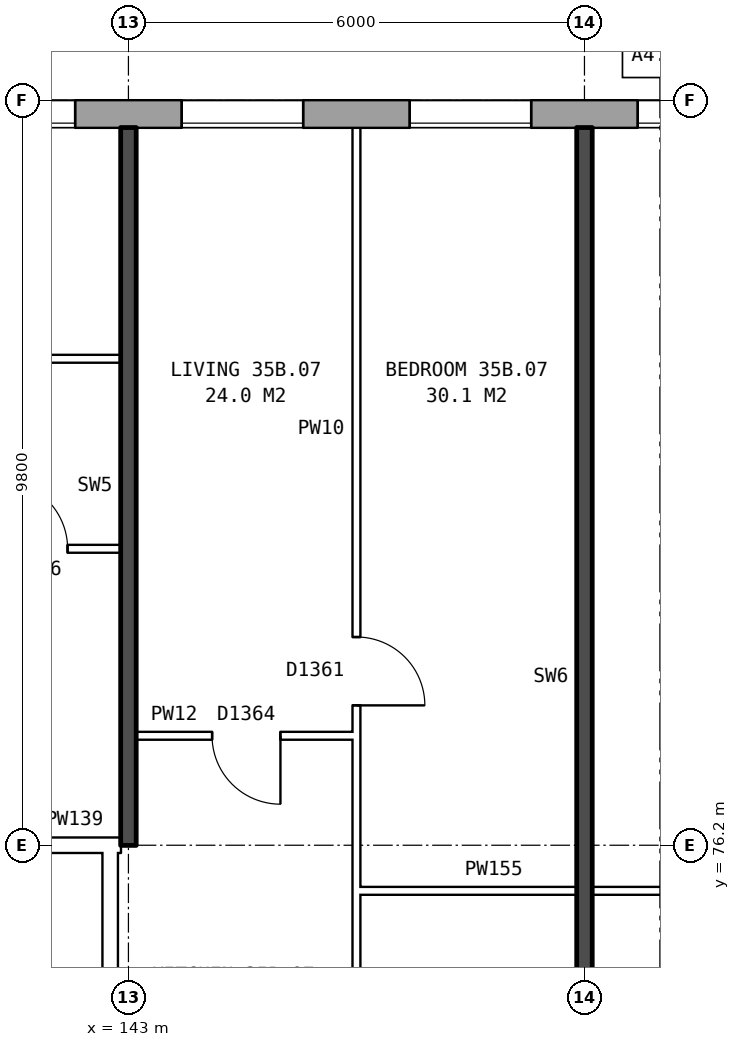
"""IFC4 building model, lengths in metres.
Left out: names, types, materials, properties, quantities, classifications, styles, units other than length and angle.
Written with IfcOpenShell. Run it as: python <this file> out.ifc"""

import sys

from ifc_helpers import new_model, si_unit, direction, frame, frame_2d, origin, place, context, subcontext, project, spatial, rectangle, extrude, element, fill, save


model = new_model("IFC4")
c1 = context("Model", 3, precision=1e-05, world=origin(), true_north=direction((0.0, 1.0)))
c2 = subcontext(c1, "Body", "Model", "MODEL_VIEW")
j1 = project(units=[si_unit("LENGTHUNIT", "METRE"), si_unit("PLANEANGLEUNIT", "RADIAN")], contexts=[c1])
p1 = place(None, origin())
s1 = spatial("IfcSite", under=j1, at=p1, CompositionType="ELEMENT")
p2 = place(p1, origin())
s2 = spatial("IfcBuilding", under=s1, at=p2, CompositionType="ELEMENT")
p3 = place(p2, frame((0.0, 0.0, 126.8)))
s3 = spatial("IfcBuildingStorey", under=s2, at=p3, CompositionType="ELEMENT", Elevation=126.8)
p4 = place(p3, frame((169.675, 85.82, 0.0), z_axis=(0.0, 0.0, 1.0), x_axis=(-1.0, 0.0, 0.0)))
e1 = element("IfcWall", 1, at=p4, inside=s3, PredefinedType="STANDARD", context=c2, shape_type="SweptSolid", body=[
    extrude(rectangle(XDim=35.601, YDim=0.36, at=frame_2d((17.8, 0.0))), origin(), (0.0, 0.0, 1.0), 2.85),
])
p5 = place(p4, frame((0.375, 0.0, 0.8)))
e2 = element("IfcOpeningElement", 2, at=p5, cuts=e1, PredefinedType="OPENING", context=c2, shape_type="SweptSolid", body=[
    extrude(rectangle(XDim=1.6, YDim=1.8, at=frame_2d((0.8, 0.9))), frame((0.0, 0.19, 0.0), z_axis=(0.0, -1.0, 0.0), x_axis=(1.0, 0.0, 0.0)), (0.0, 0.0, 1.0), 0.38),
])
p6 = place(p4, frame((2.875, 0.0, 0.8)))
e3 = element("IfcOpeningElement", 3, at=p6, cuts=e1, PredefinedType="OPENING", context=c2, shape_type="SweptSolid", body=[
    extrude(rectangle(XDim=1.0, YDim=1.8, at=frame_2d((0.5, 0.9))), frame((0.0, 0.19, 0.0), z_axis=(0.0, -1.0, 0.0), x_axis=(1.0, 0.0, 0.0)), (0.0, 0.0, 1.0), 0.38),
])
p7 = place(p4, frame((4.175, 0.0, 1.6)))
e4 = element("IfcOpeningElement", 4, at=p7, cuts=e1, PredefinedType="OPENING", context=c2, shape_type="SweptSolid", body=[
    extrude(rectangle(XDim=0.6, YDim=0.9, at=frame_2d((0.3, 0.45))), frame((0.0, 0.19, 0.0), z_axis=(0.0, -1.0, 0.0), x_axis=(1.0, 0.0, 0.0)), (0.0, 0.0, 1.0), 0.38),
])
p8 = place(p4, frame((9.375, 0.0, 0.8)))
e5 = element("IfcOpeningElement", 5, at=p8, cuts=e1, PredefinedType="OPENING", context=c2, shape_type="SweptSolid", body=[
    extrude(rectangle(XDim=1.6, YDim=1.8, at=frame_2d((0.8, 0.9))), frame((0.0, 0.19, 0.0), z_axis=(0.0, -1.0, 0.0), x_axis=(1.0, 0.0, 0.0)), (0.0, 0.0, 1.0), 0.38),
])
p9 = place(p4, frame((12.375, 0.0, 0.8)))
e6 = element("IfcOpeningElement", 6, at=p9, cuts=e1, PredefinedType="OPENING", context=c2, shape_type="SweptSolid", body=[
    extrude(rectangle(XDim=1.6, YDim=1.8, at=frame_2d((0.8, 0.9))), frame((0.0, 0.19, 0.0), z_axis=(0.0, -1.0, 0.0), x_axis=(1.0, 0.0, 0.0)), (0.0, 0.0, 1.0), 0.38),
])
p10 = place(p4, frame((15.375, 0.0, 0.8)))
e7 = element("IfcOpeningElement", 7, at=p10, cuts=e1, PredefinedType="OPENING", context=c2, shape_type="SweptSolid", body=[
    extrude(rectangle(XDim=1.6, YDim=1.8, at=frame_2d((0.8, 0.9))), frame((0.0, 0.19, 0.0), z_axis=(0.0, -1.0, 0.0), x_axis=(1.0, 0.0, 0.0)), (0.0, 0.0, 1.0), 0.38),
])
p11 = place(p4, frame((18.375, 0.0, 0.8)))
e8 = element("IfcOpeningElement", 8, at=p11, cuts=e1, PredefinedType="OPENING", context=c2, shape_type="SweptSolid", body=[
    extrude(rectangle(XDim=1.6, YDim=1.8, at=frame_2d((0.8, 0.9))), frame((0.0, 0.19, 0.0), z_axis=(0.0, -1.0, 0.0), x_axis=(1.0, 0.0, 0.0)), (0.0, 0.0, 1.0), 0.38),
])
p12 = place(p4, frame((21.375, 0.0, 0.8)))
e9 = element("IfcOpeningElement", 9, at=p12, cuts=e1, PredefinedType="OPENING", context=c2, shape_type="SweptSolid", body=[
    extrude(rectangle(XDim=1.6, YDim=1.8, at=frame_2d((0.8, 0.9))), frame((0.0, 0.19, 0.0), z_axis=(0.0, -1.0, 0.0), x_axis=(1.0, 0.0, 0.0)), (0.0, 0.0, 1.0), 0.38),
])
p13 = place(p4, frame((24.375, 0.0, 0.8)))
e10 = element("IfcOpeningElement", 10, at=p13, cuts=e1, PredefinedType="OPENING", context=c2, shape_type="SweptSolid", body=[
    extrude(rectangle(XDim=1.6, YDim=1.8, at=frame_2d((0.8, 0.9))), frame((0.0, 0.19, 0.0), z_axis=(0.0, -1.0, 0.0), x_axis=(1.0, 0.0, 0.0)), (0.0, 0.0, 1.0), 0.38),
])
p14 = place(p4, frame((27.375, 0.0, 0.8)))
e11 = element("IfcOpeningElement", 11, at=p14, cuts=e1, PredefinedType="OPENING", context=c2, shape_type="SweptSolid", body=[
    extrude(rectangle(XDim=1.6, YDim=1.8, at=frame_2d((0.8, 0.9))), frame((0.0, 0.19, 0.0), z_axis=(0.0, -1.0, 0.0), x_axis=(1.0, 0.0, 0.0)), (0.0, 0.0, 1.0), 0.38),
])
p15 = place(p4, frame((30.675, 0.0, 1.7)))
e12 = element("IfcOpeningElement", 12, at=p15, cuts=e1, PredefinedType="OPENING", context=c2, shape_type="SweptSolid", body=[
    extrude(rectangle(XDim=0.6, YDim=0.9, at=frame_2d((0.3, 0.45))), frame((0.0, 0.19, 0.0), z_axis=(0.0, -1.0, 0.0), x_axis=(1.0, 0.0, 0.0)), (0.0, 0.0, 1.0), 0.38),
])
p16 = place(p4, frame((33.375, 0.0, 0.8)))
e13 = element("IfcOpeningElement", 13, at=p16, cuts=e1, PredefinedType="OPENING", context=c2, shape_type="SweptSolid", body=[
    extrude(rectangle(XDim=1.6, YDim=1.8, at=frame_2d((0.8, 0.9))), frame((0.0, 0.19, 0.0), z_axis=(0.0, -1.0, 0.0), x_axis=(1.0, 0.0, 0.0)), (0.0, 0.0, 1.0), 0.38),
])
p17 = place(p4, frame((5.975, 0.0, 0.8)))
e14 = element("IfcOpeningElement", 14, at=p17, cuts=e1, PredefinedType="OPENING", context=c2, shape_type="SweptSolid", body=[
    extrude(rectangle(XDim=0.6, YDim=0.9, at=frame_2d((0.3, 0.45))), frame((0.0, 0.19, 0.0), z_axis=(0.0, -1.0, 0.0), x_axis=(1.0, 0.0, 0.0)), (0.0, 0.0, 1.0), 0.38),
])
p18 = place(p4, frame((6.875, 0.0, 0.8)))
e15 = element("IfcOpeningElement", 15, at=p18, cuts=e1, PredefinedType="OPENING", context=c2, shape_type="SweptSolid", body=[
    extrude(rectangle(XDim=1.6, YDim=1.8, at=frame_2d((0.8, 0.9))), frame((0.0, 0.19, 0.0), z_axis=(0.0, -1.0, 0.0), x_axis=(1.0, 0.0, 0.0)), (0.0, 0.0, 1.0), 0.38),
])
p19 = place(p4, frame((31.575, 0.0, 0.8)))
e16 = element("IfcOpeningElement", 16, at=p19, cuts=e1, PredefinedType="OPENING", context=c2, shape_type="SweptSolid", body=[
    extrude(rectangle(XDim=0.8, YDim=1.8, at=frame_2d((0.4, 0.9))), frame((0.0, 0.19, 0.0), z_axis=(0.0, -1.0, 0.0), x_axis=(1.0, 0.0, 0.0)), (0.0, 0.0, 1.0), 0.38),
])
p20 = place(p3, frame((142.76, 63.9, 0.0), z_axis=(0.0, 0.0, 1.0), x_axis=(0.0, 1.0, 0.0)))
e17 = element("IfcWall", 17, at=p20, inside=s3, PredefinedType="PARTITIONING", context=c2, shape_type="SweptSolid", body=[
    extrude(rectangle(XDim=12.2, YDim=0.2, at=frame_2d((6.1, 0.0))), origin(), (0.0, 0.0, 1.0), 2.85),
])
p21 = place(p20, frame((5.1, 0.0, 0.0)))
e18 = element("IfcOpeningElement", 18, at=p21, cuts=e17, PredefinedType="OPENING", context=c2, shape_type="SweptSolid", body=[
    extrude(rectangle(XDim=2.0, YDim=2.1, at=frame_2d((1.0, 1.05))), frame((0.0, 0.11, 0.0), z_axis=(0.0, -1.0, 0.0), x_axis=(1.0, 0.0, 0.0)), (0.0, 0.0, 1.0), 0.22),
])
p22 = place(p3, frame((146.0, 75.6, 0.0), z_axis=(0.0, 0.0, 1.0), x_axis=(1.0, 0.0, 0.0)))
e19 = element("IfcWall", 19, at=p22, inside=s3, PredefinedType="PARTITIONING", context=c2, shape_type="SweptSolid", body=[
    extrude(rectangle(XDim=6.0, YDim=0.1, at=frame_2d((3.0, 0.0))), origin(), (0.0, 0.0, 1.0), 2.85),
])
p23 = place(p3, frame((139.76, 76.2, 0.0), z_axis=(0.0, 0.0, 1.0), x_axis=(1.0, 0.0, 0.0)))
e20 = element("IfcWall", 20, at=p23, inside=s3, PredefinedType="PARTITIONING", context=c2, shape_type="SweptSolid", body=[
    extrude(rectangle(XDim=3.0, YDim=0.2, at=frame_2d((1.5, 0.0))), origin(), (0.0, 0.0, 1.0), 2.85),
])
p24 = place(p23, frame((1.0, 0.0, 0.0)))
e21 = element("IfcOpeningElement", 21, at=p24, cuts=e20, PredefinedType="OPENING", context=c2, shape_type="SweptSolid", body=[
    extrude(rectangle(XDim=1.0, YDim=2.1, at=frame_2d((0.5, 1.05))), frame((0.0, 0.11, 0.0), z_axis=(0.0, -1.0, 0.0), x_axis=(1.0, 0.0, 0.0)), (0.0, 0.0, 1.0), 0.22),
])
p25 = place(p3, frame((142.76, 76.2, 0.0), z_axis=(0.0, 0.0, 1.0), x_axis=(1.0, 0.0, 0.0)))
e22 = element("IfcWall", 22, at=p25, inside=s3, PredefinedType="PARTITIONING", context=c2, shape_type="SweptSolid", body=[
    extrude(rectangle(XDim=0.14, YDim=0.2, at=frame_2d((0.07, 0.0))), origin(), (0.0, 0.0, 1.0), 2.85),
])
p26 = place(p3, frame((143.1, 77.64, 0.0), z_axis=(0.0, 0.0, 1.0), x_axis=(1.0, 0.0, 0.0)))
e23 = element("IfcWall", 23, at=p26, inside=s3, PredefinedType="PARTITIONING", context=c2, shape_type="SweptSolid", body=[
    extrude(rectangle(XDim=2.9, YDim=0.1, at=frame_2d((1.45, 0.0))), origin(), (0.0, 0.0, 1.0), 2.85),
])
p27 = place(p26, frame((1.0, 0.0, 0.0)))
e24 = element("IfcOpeningElement", 24, at=p27, cuts=e23, PredefinedType="OPENING", context=c2, shape_type="SweptSolid", body=[
    extrude(rectangle(XDim=0.9, YDim=2.1, at=frame_2d((0.45, 1.05))), frame((0.0, 0.06, 0.0), z_axis=(0.0, -1.0, 0.0), x_axis=(1.0, 0.0, 0.0)), (0.0, 0.0, 1.0), 0.12),
])
p28 = place(p3, frame((137.1, 80.1, 0.0), z_axis=(0.0, 0.0, 1.0), x_axis=(1.0, 0.0, 0.0)))
e25 = element("IfcWall", 25, at=p28, inside=s3, PredefinedType="PARTITIONING", context=c2, shape_type="SweptSolid", body=[
    extrude(rectangle(XDim=5.8, YDim=0.1, at=frame_2d((2.9, 0.0))), origin(), (0.0, 0.0, 1.0), 2.85),
])
p29 = place(p28, frame((1.3, 0.0, 0.0)))
e26 = element("IfcOpeningElement", 26, at=p29, cuts=e25, PredefinedType="OPENING", context=c2, shape_type="SweptSolid", body=[
    extrude(rectangle(XDim=0.9, YDim=2.1, at=frame_2d((0.45, 1.05))), frame((0.0, 0.06, 0.0), z_axis=(0.0, -1.0, 0.0), x_axis=(1.0, 0.0, 0.0)), (0.0, 0.0, 1.0), 0.12),
])
p30 = place(p28, frame((4.2, 0.0, 0.0)))
e27 = element("IfcOpeningElement", 27, at=p30, cuts=e25, PredefinedType="OPENING", context=c2, shape_type="SweptSolid", body=[
    extrude(rectangle(XDim=0.9, YDim=2.1, at=frame_2d((0.45, 1.05))), frame((0.0, 0.06, 0.0), z_axis=(0.0, -1.0, 0.0), x_axis=(1.0, 0.0, 0.0)), (0.0, 0.0, 1.0), 0.12),
])
p31 = place(p3, frame((140.6, 82.6, 0.0), z_axis=(0.0, 0.0, 1.0), x_axis=(1.0, 0.0, 0.0)))
e28 = element("IfcWall", 28, at=p31, inside=s3, PredefinedType="PARTITIONING", context=c2, shape_type="SweptSolid", body=[
    extrude(rectangle(XDim=2.3, YDim=0.1, at=frame_2d((1.15, 0.0))), origin(), (0.0, 0.0, 1.0), 2.85),
])
p32 = place(p3, frame((143.0, 76.2, 0.0), z_axis=(0.0, 0.0, 1.0), x_axis=(0.0, 1.0, 0.0)))
e29 = element("IfcWall", 29, at=p32, inside=s3, PredefinedType="SOLIDWALL", context=c2, shape_type="SweptSolid", body=[
    extrude(rectangle(XDim=9.44, YDim=0.2, at=frame_2d((4.72, 0.0))), origin(), (0.0, 0.0, 1.0), 2.85),
])
p33 = place(p3, frame((146.0, 71.3, 0.0), z_axis=(0.0, 0.0, 1.0), x_axis=(0.0, 1.0, 0.0)))
e30 = element("IfcWall", 30, at=p33, inside=s3, PredefinedType="PARTITIONING", context=c2, shape_type="SweptSolid", body=[
    extrude(rectangle(XDim=14.34, YDim=0.1, at=frame_2d((7.17, 0.0))), origin(), (0.0, 0.0, 1.0), 2.85),
])
p34 = place(p33, frame((6.74, 0.0, 0.0)))
e31 = element("IfcOpeningElement", 31, at=p34, cuts=e30, PredefinedType="OPENING", context=c2, shape_type="SweptSolid", body=[
    extrude(rectangle(XDim=0.9, YDim=2.1, at=frame_2d((0.45, 1.05))), frame((0.0, 0.06, 0.0), z_axis=(0.0, -1.0, 0.0), x_axis=(1.0, 0.0, 0.0)), (0.0, 0.0, 1.0), 0.12),
])
p35 = place(p33, frame((0.4, 0.0, 0.0)))
e32 = element("IfcOpeningElement", 32, at=p35, cuts=e30, PredefinedType="OPENING", context=c2, shape_type="SweptSolid", body=[
    extrude(rectangle(XDim=0.9, YDim=2.1, at=frame_2d((0.45, 1.05))), frame((0.0, 0.06, 0.0), z_axis=(0.0, -1.0, 0.0), x_axis=(1.0, 0.0, 0.0)), (0.0, 0.0, 1.0), 0.12),
])
p36 = place(p3, frame((149.0, 71.2, 0.0), z_axis=(0.0, 0.0, 1.0), x_axis=(0.0, 1.0, 0.0)))
e33 = element("IfcWall", 33, at=p36, inside=s3, PredefinedType="SOLIDWALL", context=c2, shape_type="SweptSolid", body=[
    extrude(rectangle(XDim=14.44, YDim=0.2, at=frame_2d((7.22, 0.0))), origin(), (0.0, 0.0, 1.0), 2.85),
])
p37 = place(p11, origin())
e34 = element("IfcWindow", 34, at=p37, inside=s3, PartitioningType="SINGLE_PANEL", PredefinedType="WINDOW", context=c2, shape_type="SweptSolid", body=[
    extrude(rectangle(XDim=1.6, YDim=1.8, at=frame_2d((0.8, 0.9))), frame((0.0, 0.15, 0.0), z_axis=(0.0, -1.0, 0.0), x_axis=(1.0, 0.0, 0.0)), (0.0, 0.0, 1.0), 0.06),
])
fill(e8, e34)
p38 = place(p12, origin())
e35 = element("IfcWindow", 35, at=p38, inside=s3, PartitioningType="SINGLE_PANEL", PredefinedType="WINDOW", context=c2, shape_type="SweptSolid", body=[
    extrude(rectangle(XDim=1.6, YDim=1.8, at=frame_2d((0.8, 0.9))), frame((0.0, 0.15, 0.0), z_axis=(0.0, -1.0, 0.0), x_axis=(1.0, 0.0, 0.0)), (0.0, 0.0, 1.0), 0.06),
])
fill(e9, e35)
p39 = place(p13, origin())
e36 = element("IfcWindow", 36, at=p39, inside=s3, PartitioningType="SINGLE_PANEL", PredefinedType="WINDOW", context=c2, shape_type="SweptSolid", body=[
    extrude(rectangle(XDim=1.6, YDim=1.8, at=frame_2d((0.8, 0.9))), frame((0.0, 0.15, 0.0), z_axis=(0.0, -1.0, 0.0), x_axis=(1.0, 0.0, 0.0)), (0.0, 0.0, 1.0), 0.06),
])
fill(e10, e36)
p40 = place(p14, origin())
e37 = element("IfcWindow", 37, at=p40, inside=s3, PartitioningType="SINGLE_PANEL", PredefinedType="WINDOW", context=c2, shape_type="SweptSolid", body=[
    extrude(rectangle(XDim=1.6, YDim=1.8, at=frame_2d((0.8, 0.9))), frame((0.0, 0.15, 0.0), z_axis=(0.0, -1.0, 0.0), x_axis=(1.0, 0.0, 0.0)), (0.0, 0.0, 1.0), 0.06),
])
fill(e11, e37)
p41 = place(p30, origin())
e38 = element("IfcDoor", 38, at=p41, inside=s3, OperationType="SINGLE_SWING_LEFT", PredefinedType="DOOR", context=c2, shape_type="SweptSolid", body=[
    extrude(rectangle(XDim=0.9, YDim=2.1, at=frame_2d((0.45, 1.05))), frame((0.0, 0.025, 0.0), z_axis=(0.0, -1.0, 0.0), x_axis=(1.0, 0.0, 0.0)), (0.0, 0.0, 1.0), 0.05),
])
fill(e27, e38)
p42 = place(p34, frame((0.9, 0.0, 0.0), z_axis=(0.0, 0.0, 1.0), x_axis=(-1.0, 0.0, 0.0)))
e39 = element("IfcDoor", 39, at=p42, inside=s3, OperationType="SINGLE_SWING_RIGHT", PredefinedType="DOOR", context=c2, shape_type="SweptSolid", body=[
    extrude(rectangle(XDim=0.9, YDim=2.1, at=frame_2d((0.45, 1.05))), frame((0.0, 0.025, 0.0), z_axis=(0.0, -1.0, 0.0), x_axis=(1.0, 0.0, 0.0)), (0.0, 0.0, 1.0), 0.05),
])
fill(e31, e39)
p43 = place(p27, frame((0.9, 0.0, 0.0), z_axis=(0.0, 0.0, 1.0), x_axis=(-1.0, 0.0, 0.0)))
e40 = element("IfcDoor", 40, at=p43, inside=s3, OperationType="SINGLE_SWING_LEFT", PredefinedType="DOOR", context=c2, shape_type="SweptSolid", body=[
    extrude(rectangle(XDim=0.9, YDim=2.1, at=frame_2d((0.45, 1.05))), frame((0.0, 0.025, 0.0), z_axis=(0.0, -1.0, 0.0), x_axis=(1.0, 0.0, 0.0)), (0.0, 0.0, 1.0), 0.05),
])
fill(e24, e40)
save(model, sys.argv[1])
